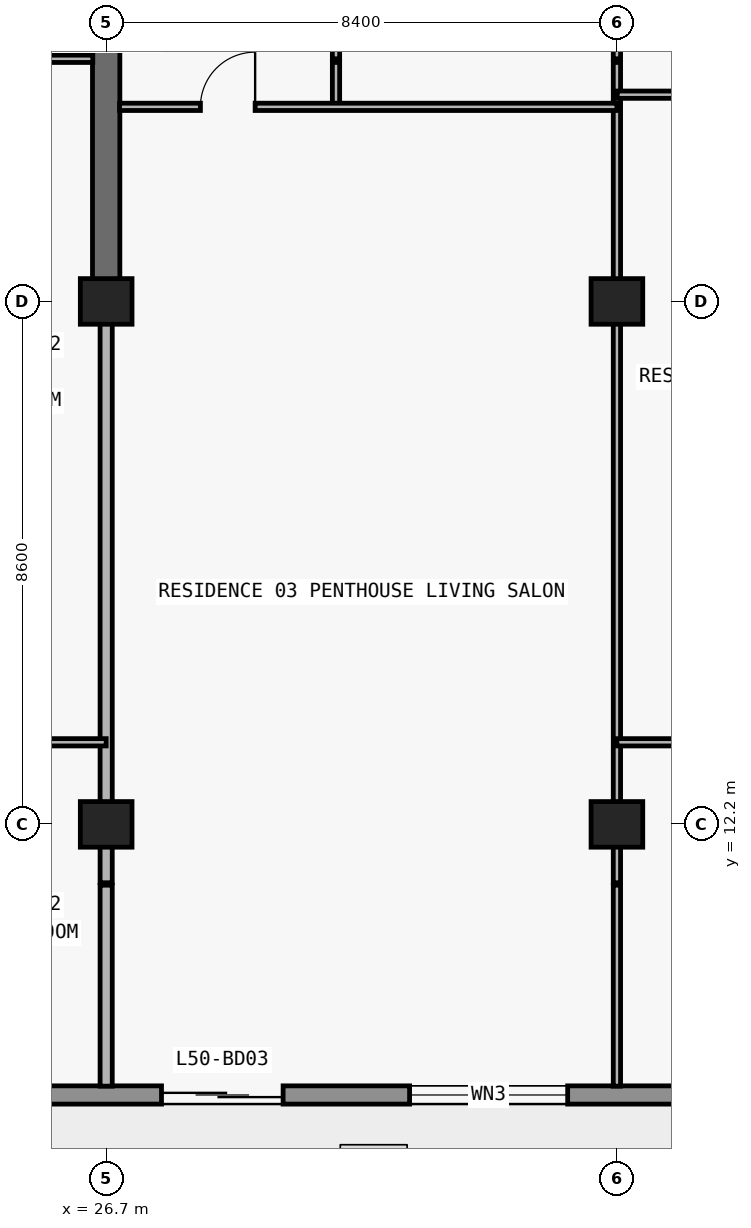
"""IFC4 building model, lengths in metres.
Left out: names, types, materials, properties, quantities, classifications, styles, units other than length and angle.
Written with IfcOpenShell. Run it as: python <this file> out.ifc"""

import sys

from ifc_helpers import new_model, si_unit, direction, frame, frame_2d, origin, origin_2d, place, context, subcontext, project, spatial, rectangle, extrude, element, fill, save


model = new_model("IFC4")
c1 = context("Model", 3, precision=1e-05, world=origin(), true_north=direction((0.0, 1.0)))
c2 = subcontext(c1, "Body", "Model", "MODEL_VIEW")
j1 = project(units=[si_unit("LENGTHUNIT", "METRE"), si_unit("PLANEANGLEUNIT", "RADIAN")], contexts=[c1])
p1 = place(None, origin())
s1 = spatial("IfcSite", under=j1, at=p1, CompositionType="ELEMENT")
p2 = place(p1, origin())
s2 = spatial("IfcBuilding", under=s1, at=p2, CompositionType="ELEMENT")
p3 = place(p2, frame((0.0, 0.0, 180.3)))
s3 = spatial("IfcBuildingStorey", under=s2, at=p3, CompositionType="ELEMENT", Elevation=180.3)
for number, where, z_axis, x_axis in (
    (1, (26.7, 12.2, 0.0), (0.0, 0.0, 1.0), (1.0, 0.0, 0.0)),
    (2, (35.1, 12.2, 0.0), (0.0, 0.0, 1.0), (1.0, 0.0, 0.0)),
    (3, (26.7, 20.8, 0.0), (0.0, 0.0, 1.0), (1.0, 0.0, 0.0)),
    (4, (35.1, 20.8, 0.0), (0.0, 0.0, 1.0), (1.0, 0.0, 0.0)),
):
    element("IfcColumn", number, at=place(p3, frame(where, z_axis=z_axis, x_axis=x_axis)), inside=s3, PredefinedType="COLUMN", context=c2, shape_type="SweptSolid", body=[
        extrude(rectangle(XDim=0.85, YDim=0.75, at=origin_2d()), origin(), (0.0, 0.0, 1.0), 3.0),
    ])
p4 = place(p3, frame((26.7, 20.8, 0.0), z_axis=(0.0, 0.0, 1.0), x_axis=(0.0, 1.0, 0.0)))
e5 = element("IfcWall", 5, at=p4, inside=s3, PredefinedType="SHEAR", context=c2, shape_type="SweptSolid", body=[
    extrude(rectangle(XDim=8.6, YDim=0.45, at=frame_2d((4.3, 0.0))), origin(), (0.0, 0.0, 1.0), 3.0),
])
p5 = place(p3, frame((67.7, 7.75, 0.0), z_axis=(0.0, 0.0, 1.0), x_axis=(-1.0, 0.0, 0.0)))
e6 = element("IfcWall", 6, at=p5, inside=s3, PredefinedType="STANDARD", context=c2, shape_type="SweptSolid", body=[
    extrude(rectangle(XDim=57.6, YDim=0.3, at=frame_2d((28.8, 0.0))), origin(), (0.0, 0.0, 1.0), 3.0),
])
p6 = place(p5, frame((54.673, 0.0, 0.0)))
e7 = element("IfcOpeningElement", 7, at=p6, cuts=e6, PredefinedType="OPENING", context=c2, shape_type="SweptSolid", body=[
    extrude(rectangle(XDim=2.0, YDim=2.3, at=frame_2d((1.0, 1.15))), frame((0.0, 0.16, 0.0), z_axis=(0.0, -1.0, 0.0), x_axis=(1.0, 0.0, 0.0)), (0.0, 0.0, 1.0), 0.32),
])
p7 = place(p5, frame((50.473, 0.0, 0.85)))
e8 = element("IfcOpeningElement", 8, at=p7, cuts=e6, PredefinedType="OPENING", context=c2, shape_type="SweptSolid", body=[
    extrude(rectangle(XDim=2.2, YDim=1.55, at=frame_2d((1.1, 0.775))), frame((0.0, 0.16, 0.0), z_axis=(0.0, -1.0, 0.0), x_axis=(1.0, 0.0, 0.0)), (0.0, 0.0, 1.0), 0.32),
])
p8 = place(p5, frame((46.09, 0.0, 0.0)))
e9 = element("IfcOpeningElement", 9, at=p8, cuts=e6, PredefinedType="OPENING", context=c2, shape_type="SweptSolid", body=[
    extrude(rectangle(XDim=2.0, YDim=2.3, at=frame_2d((1.0, 1.15))), frame((0.0, 0.16, 0.0), z_axis=(0.0, -1.0, 0.0), x_axis=(1.0, 0.0, 0.0)), (0.0, 0.0, 1.0), 0.32),
])
p9 = place(p5, frame((41.99, 0.0, 0.85)))
e10 = element("IfcOpeningElement", 10, at=p9, cuts=e6, PredefinedType="OPENING", context=c2, shape_type="SweptSolid", body=[
    extrude(rectangle(XDim=1.8, YDim=1.55, at=frame_2d((0.9, 0.775))), frame((0.0, 0.16, 0.0), z_axis=(0.0, -1.0, 0.0), x_axis=(1.0, 0.0, 0.0)), (0.0, 0.0, 1.0), 0.32),
])
p10 = place(p5, frame((38.09, 0.0, 0.0)))
e11 = element("IfcOpeningElement", 11, at=p10, cuts=e6, PredefinedType="OPENING", context=c2, shape_type="SweptSolid", body=[
    extrude(rectangle(XDim=2.0, YDim=2.3, at=frame_2d((1.0, 1.15))), frame((0.0, 0.16, 0.0), z_axis=(0.0, -1.0, 0.0), x_axis=(1.0, 0.0, 0.0)), (0.0, 0.0, 1.0), 0.32),
])
p11 = place(p5, frame((33.41, 0.0, 0.65)))
e12 = element("IfcOpeningElement", 12, at=p11, cuts=e6, PredefinedType="OPENING", context=c2, shape_type="SweptSolid", body=[
    extrude(rectangle(XDim=2.6, YDim=1.85, at=frame_2d((1.3, 0.925))), frame((0.0, 0.16, 0.0), z_axis=(0.0, -1.0, 0.0), x_axis=(1.0, 0.0, 0.0)), (0.0, 0.0, 1.0), 0.32),
])
p12 = place(p5, frame((27.7, 0.0, 0.85)))
e13 = element("IfcOpeningElement", 13, at=p12, cuts=e6, PredefinedType="OPENING", context=c2, shape_type="SweptSolid", body=[
    extrude(rectangle(XDim=2.2, YDim=1.55, at=frame_2d((1.1, 0.775))), frame((0.0, 0.16, 0.0), z_axis=(0.0, -1.0, 0.0), x_axis=(1.0, 0.0, 0.0)), (0.0, 0.0, 1.0), 0.32),
])
p13 = place(p5, frame((19.7, 0.0, 0.85)))
e14 = element("IfcOpeningElement", 14, at=p13, cuts=e6, PredefinedType="OPENING", context=c2, shape_type="SweptSolid", body=[
    extrude(rectangle(XDim=2.2, YDim=1.55, at=frame_2d((1.1, 0.775))), frame((0.0, 0.16, 0.0), z_axis=(0.0, -1.0, 0.0), x_axis=(1.0, 0.0, 0.0)), (0.0, 0.0, 1.0), 0.32),
])
p14 = place(p5, frame((13.29, 0.0, 0.0)))
e15 = element("IfcOpeningElement", 15, at=p14, cuts=e6, PredefinedType="OPENING", context=c2, shape_type="SweptSolid", body=[
    extrude(rectangle(XDim=2.0, YDim=2.3, at=frame_2d((1.0, 1.15))), frame((0.0, 0.16, 0.0), z_axis=(0.0, -1.0, 0.0), x_axis=(1.0, 0.0, 0.0)), (0.0, 0.0, 1.0), 0.32),
])
p15 = place(p5, frame((9.19, 0.0, 0.85)))
e16 = element("IfcOpeningElement", 16, at=p15, cuts=e6, PredefinedType="OPENING", context=c2, shape_type="SweptSolid", body=[
    extrude(rectangle(XDim=1.8, YDim=1.55, at=frame_2d((0.9, 0.775))), frame((0.0, 0.16, 0.0), z_axis=(0.0, -1.0, 0.0), x_axis=(1.0, 0.0, 0.0)), (0.0, 0.0, 1.0), 0.32),
])
p16 = place(p5, frame((5.273, 0.0, 0.0)))
e17 = element("IfcOpeningElement", 17, at=p16, cuts=e6, PredefinedType="OPENING", context=c2, shape_type="SweptSolid", body=[
    extrude(rectangle(XDim=2.0, YDim=2.3, at=frame_2d((1.0, 1.15))), frame((0.0, 0.16, 0.0), z_axis=(0.0, -1.0, 0.0), x_axis=(1.0, 0.0, 0.0)), (0.0, 0.0, 1.0), 0.32),
])
p17 = place(p5, frame((1.073, 0.0, 0.85)))
e18 = element("IfcOpeningElement", 18, at=p17, cuts=e6, PredefinedType="OPENING", context=c2, shape_type="SweptSolid", body=[
    extrude(rectangle(XDim=2.2, YDim=1.55, at=frame_2d((1.1, 0.775))), frame((0.0, 0.16, 0.0), z_axis=(0.0, -1.0, 0.0), x_axis=(1.0, 0.0, 0.0)), (0.0, 0.0, 1.0), 0.32),
])
p18 = place(p3, frame((26.7, 7.895, 0.0), z_axis=(0.0, 0.0, 1.0), x_axis=(0.0, 1.0, 0.0)))
e19 = element("IfcWall", 19, at=p18, inside=s3, PredefinedType="PARTITIONING", context=c2, shape_type="SweptSolid", body=[
    extrude(rectangle(XDim=3.305, YDim=0.2, at=frame_2d((1.652, 0.0))), origin(), (0.0, 0.0, 1.0), 3.0),
])
p19 = place(p3, frame((26.7, 11.24, 0.0), z_axis=(0.0, 0.0, 1.0), x_axis=(0.0, 1.0, 0.0)))
e20 = element("IfcWall", 20, at=p19, inside=s3, PredefinedType="PARTITIONING", context=c2, shape_type="SweptSolid", body=[
    extrude(rectangle(XDim=9.555, YDim=0.2, at=frame_2d((4.777, 0.0))), origin(), (0.0, 0.0, 1.0), 2.213),
])
p20 = place(p3, frame((30.48, 24.0, 0.0), z_axis=(0.0, 0.0, 1.0), x_axis=(0.0, 1.0, 0.0)))
e21 = element("IfcWall", 21, at=p20, inside=s3, PredefinedType="PARTITIONING", context=c2, shape_type="SweptSolid", body=[
    extrude(rectangle(XDim=0.73, YDim=0.12, at=frame_2d((0.365, 0.0))), origin(), (0.0, 0.0, 1.0), 3.0),
])
p21 = place(p3, frame((30.48, 24.79, 0.0), z_axis=(0.0, 0.0, 1.0), x_axis=(0.0, 1.0, 0.0)))
e22 = element("IfcWall", 22, at=p21, inside=s3, PredefinedType="PARTITIONING", context=c2, shape_type="SweptSolid", body=[
    extrude(rectangle(XDim=0.34, YDim=0.12, at=frame_2d((0.17, 0.0))), origin(), (0.0, 0.0, 1.0), 3.0),
])
p22 = place(p3, frame((35.1, 7.895, 0.0), z_axis=(0.0, 0.0, 1.0), x_axis=(0.0, 1.0, 0.0)))
e23 = element("IfcWall", 23, at=p22, inside=s3, PredefinedType="PARTITIONING", context=c2, shape_type="SweptSolid", body=[
    extrude(rectangle(XDim=3.305, YDim=0.12, at=frame_2d((1.652, 0.0))), origin(), (0.0, 0.0, 1.0), 3.0),
])
p23 = place(p3, frame((35.1, 11.24, 0.0), z_axis=(0.0, 0.0, 1.0), x_axis=(0.0, 1.0, 0.0)))
e24 = element("IfcWall", 24, at=p23, inside=s3, PredefinedType="PARTITIONING", context=c2, shape_type="SweptSolid", body=[
    extrude(rectangle(XDim=13.49, YDim=0.12, at=frame_2d((6.745, 0.0))), origin(), (0.0, 0.0, 1.0), 2.213),
])
p24 = place(p3, frame((35.1, 24.79, 0.0), z_axis=(0.0, 0.0, 1.0), x_axis=(0.0, 1.0, 0.0)))
e25 = element("IfcWall", 25, at=p24, inside=s3, PredefinedType="PARTITIONING", context=c2, shape_type="SweptSolid", body=[
    extrude(rectangle(XDim=0.34, YDim=0.12, at=frame_2d((0.17, 0.0))), origin(), (0.0, 0.0, 1.0), 2.213),
])
p25 = place(p3, frame((22.92, 13.55, 0.0), z_axis=(0.0, 0.0, 1.0), x_axis=(1.0, 0.0, 0.0)))
e26 = element("IfcWall", 26, at=p25, inside=s3, PredefinedType="PARTITIONING", context=c2, shape_type="SweptSolid", body=[
    extrude(rectangle(XDim=3.78, YDim=0.12, at=frame_2d((1.89, 0.0))), origin(), (0.0, 0.0, 1.0), 3.0),
])
p26 = place(p25, frame((1.44, 0.0, 0.0)))
e27 = element("IfcOpeningElement", 27, at=p26, cuts=e26, PredefinedType="OPENING", context=c2, shape_type="SweptSolid", body=[
    extrude(rectangle(XDim=0.9, YDim=2.15, at=frame_2d((0.45, 1.075))), frame((0.0, 0.07, 0.0), z_axis=(0.0, -1.0, 0.0), x_axis=(1.0, 0.0, 0.0)), (0.0, 0.0, 1.0), 0.14),
])
p27 = place(p3, frame((35.1, 13.55, 0.0), z_axis=(0.0, 0.0, 1.0), x_axis=(1.0, 0.0, 0.0)))
e28 = element("IfcWall", 28, at=p27, inside=s3, PredefinedType="PARTITIONING", context=c2, shape_type="SweptSolid", body=[
    extrude(rectangle(XDim=16.0, YDim=0.12, at=frame_2d((8.0, 0.0))), origin(), (0.0, 0.0, 1.0), 3.0),
])
p28 = place(p27, frame((3.35, 0.0, 0.0)))
e29 = element("IfcOpeningElement", 29, at=p28, cuts=e28, PredefinedType="OPENING", context=c2, shape_type="SweptSolid", body=[
    extrude(rectangle(XDim=0.9, YDim=2.15, at=frame_2d((0.45, 1.075))), frame((0.0, 0.07, 0.0), z_axis=(0.0, -1.0, 0.0), x_axis=(1.0, 0.0, 0.0)), (0.0, 0.0, 1.0), 0.14),
])
p29 = place(p27, frame((11.35, 0.0, 0.0)))
e30 = element("IfcOpeningElement", 30, at=p29, cuts=e28, PredefinedType="OPENING", context=c2, shape_type="SweptSolid", body=[
    extrude(rectangle(XDim=0.9, YDim=2.15, at=frame_2d((0.45, 1.075))), frame((0.0, 0.07, 0.0), z_axis=(0.0, -1.0, 0.0), x_axis=(1.0, 0.0, 0.0)), (0.0, 0.0, 1.0), 0.14),
])
p30 = place(p3, frame((26.92, 24.0, 0.0), z_axis=(0.0, 0.0, 1.0), x_axis=(1.0, 0.0, 0.0)))
e31 = element("IfcWall", 31, at=p30, inside=s3, PredefinedType="PARTITIONING", context=c2, shape_type="SweptSolid", body=[
    extrude(rectangle(XDim=8.18, YDim=0.12, at=frame_2d((4.09, 0.0))), origin(), (0.0, 0.0, 1.0), 3.0),
])
p31 = place(p30, frame((1.33, 0.0, 0.0)))
e32 = element("IfcOpeningElement", 32, at=p31, cuts=e31, PredefinedType="OPENING", context=c2, shape_type="SweptSolid", body=[
    extrude(rectangle(XDim=0.9, YDim=2.15, at=frame_2d((0.45, 1.075))), frame((0.0, 0.07, 0.0), z_axis=(0.0, -1.0, 0.0), x_axis=(1.0, 0.0, 0.0)), (0.0, 0.0, 1.0), 0.14),
])
p32 = place(p3, frame((35.105, 24.2, 0.0), z_axis=(0.0, 0.0, 1.0), x_axis=(1.0, 0.0, 0.0)))
e33 = element("IfcWall", 33, at=p32, inside=s3, PredefinedType="PARTITIONING", context=c2, shape_type="SweptSolid", body=[
    extrude(rectangle(XDim=7.59, YDim=0.12, at=frame_2d((3.795, 0.0))), origin(), (0.0, 0.0, 1.0), 3.0),
])
p33 = place(p32, frame((3.345, 0.0, 0.0)))
e34 = element("IfcOpeningElement", 34, at=p33, cuts=e33, PredefinedType="OPENING", context=c2, shape_type="SweptSolid", body=[
    extrude(rectangle(XDim=0.9, YDim=2.15, at=frame_2d((0.45, 1.075))), frame((0.0, 0.07, 0.0), z_axis=(0.0, -1.0, 0.0), x_axis=(1.0, 0.0, 0.0)), (0.0, 0.0, 1.0), 0.14),
])
p34 = place(p3, frame((18.3, 24.79, 0.0), z_axis=(0.0, 0.0, 1.0), x_axis=(1.0, 0.0, 0.0)))
e35 = element("IfcWall", 35, at=p34, inside=s3, PredefinedType="PARTITIONING", context=c2, shape_type="SweptSolid", body=[
    extrude(rectangle(XDim=8.18, YDim=0.12, at=frame_2d((4.09, 0.0))), origin(), (0.0, 0.0, 1.0), 3.0),
])
p35 = place(p34, frame((1.818, 0.0, 0.0)))
e36 = element("IfcOpeningElement", 36, at=p35, cuts=e35, PredefinedType="OPENING", context=c2, shape_type="SweptSolid", body=[
    extrude(rectangle(XDim=0.9, YDim=2.15, at=frame_2d((0.45, 1.075))), frame((0.0, 0.07, 0.0), z_axis=(0.0, -1.0, 0.0), x_axis=(1.0, 0.0, 0.0)), (0.0, 0.0, 1.0), 0.14),
])
p36 = place(p34, frame((5.95, 0.0, 0.0)))
e37 = element("IfcOpeningElement", 37, at=p36, cuts=e35, PredefinedType="OPENING", context=c2, shape_type="SweptSolid", body=[
    extrude(rectangle(XDim=0.9, YDim=2.15, at=frame_2d((0.45, 1.075))), frame((0.0, 0.07, 0.0), z_axis=(0.0, -1.0, 0.0), x_axis=(1.0, 0.0, 0.0)), (0.0, 0.0, 1.0), 0.14),
])
p37 = place(p10, origin())
e38 = element("IfcDoor", 38, at=p37, inside=s3, OperationType="DOUBLE_DOOR_SLIDING", PredefinedType="DOOR", context=c2, shape_type="SweptSolid", body=[
    extrude(rectangle(XDim=2.0, YDim=2.3, at=frame_2d((1.0, 1.15))), frame((0.0, 0.025, 0.0), z_axis=(0.0, -1.0, 0.0), x_axis=(1.0, 0.0, 0.0)), (0.0, 0.0, 1.0), 0.05),
])
fill(e11, e38)
p38 = place(p11, origin())
e39 = element("IfcWindow", 39, at=p38, inside=s3, PartitioningType="SINGLE_PANEL", PredefinedType="WINDOW", context=c2, shape_type="SweptSolid", body=[
    extrude(rectangle(XDim=2.6, YDim=1.85, at=frame_2d((1.3, 0.925))), frame((0.0, 0.03, 0.0), z_axis=(0.0, -1.0, 0.0), x_axis=(1.0, 0.0, 0.0)), (0.0, 0.0, 1.0), 0.06),
])
fill(e12, e39)
p39 = place(p31, origin())
e40 = element("IfcDoor", 40, at=p39, inside=s3, OperationType="SINGLE_SWING_RIGHT", PredefinedType="DOOR", context=c2, shape_type="SweptSolid", body=[
    extrude(rectangle(XDim=0.9, YDim=2.15, at=frame_2d((0.45, 1.075))), frame((0.0, 0.025, 0.0), z_axis=(0.0, -1.0, 0.0), x_axis=(1.0, 0.0, 0.0)), (0.0, 0.0, 1.0), 0.05),
])
fill(e32, e40)
save(model, sys.argv[1])
